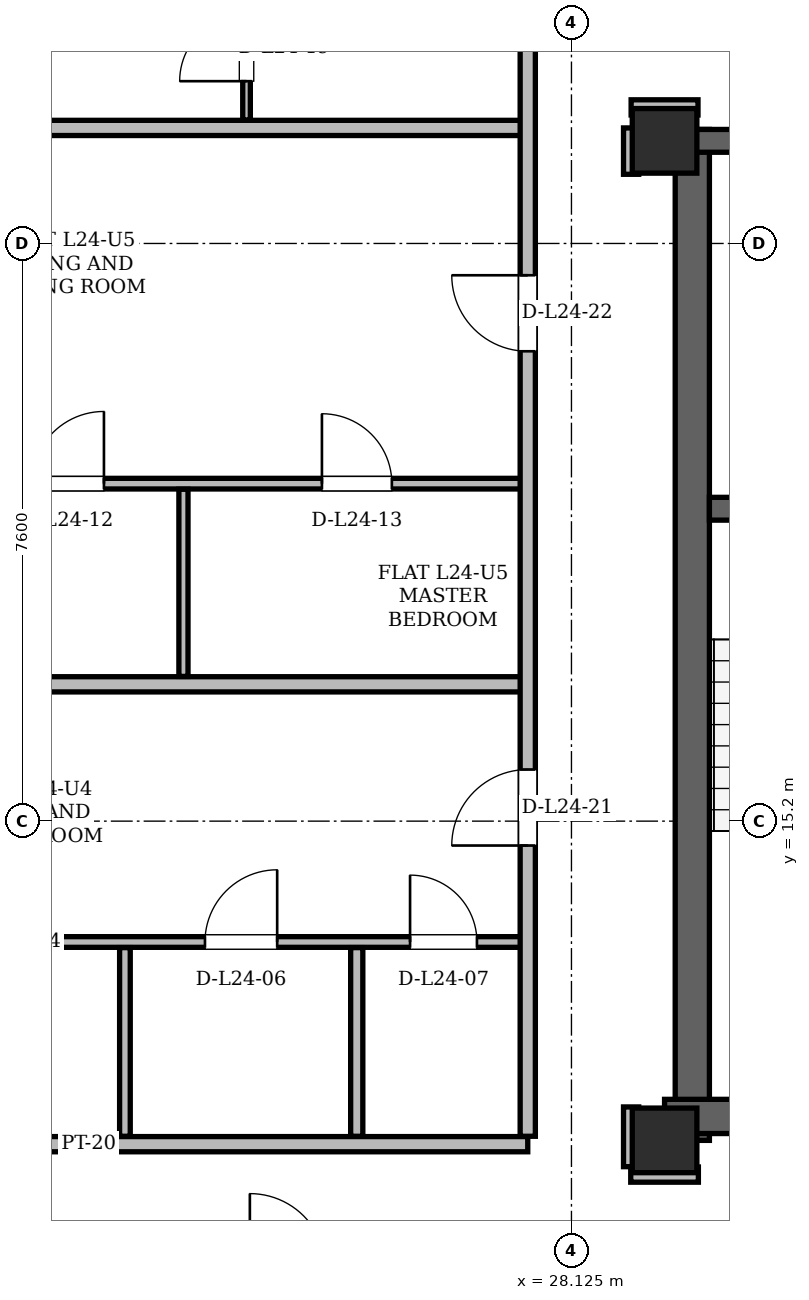
"""IFC4 building model, lengths in metres.
Left out: names, types, materials, properties, quantities, classifications, styles, units other than length and angle.
Written with IfcOpenShell. Run it as: python <this file> out.ifc"""

import sys

from ifc_helpers import new_model, si_unit, direction, frame, frame_2d, origin, origin_2d, place, context, subcontext, project, spatial, rectangle, hollow_rectangle, extrude, element, fill, save


model = new_model("IFC4")
c1 = context("Model", 3, precision=1e-05, world=origin(), true_north=direction((0.0, 1.0)))
c2 = subcontext(c1, "Body", "Model", "MODEL_VIEW")
j1 = project(units=[si_unit("LENGTHUNIT", "METRE"), si_unit("PLANEANGLEUNIT", "RADIAN")], contexts=[c1])
p1 = place(None, origin())
s1 = spatial("IfcSite", under=j1, at=p1, CompositionType="ELEMENT")
p2 = place(p1, origin())
s2 = spatial("IfcBuilding", under=s1, at=p2, CompositionType="ELEMENT")
p3 = place(p2, frame((0.0, 0.0, 93.3)))
s3 = spatial("IfcBuildingStorey", under=s2, at=p3, CompositionType="ELEMENT", Elevation=93.3)
for number, where, z_axis, x_axis in (
    (1, (29.35, 11.0, 0.0), (0.0, 0.0, 1.0), (1.0, 0.0, 0.0)),
    (2, (29.35, 24.15, 0.0), (0.0, 0.0, 1.0), (1.0, 0.0, 0.0)),
):
    element("IfcColumn", number, at=place(p3, frame(where, z_axis=z_axis, x_axis=x_axis)), inside=s3, PredefinedType="COLUMN", context=c2, shape_type="SweptSolid", body=[
        extrude(hollow_rectangle(XDim=0.85, YDim=0.85, WallThickness=0.07, at=origin_2d()), origin(), (0.0, 0.0, 1.0), 3.6),
    ])
p4 = place(p3, frame((29.715, 11.0, 0.0), z_axis=(0.0, 0.0, 1.0), x_axis=(0.0, 1.0, 0.0)))
e3 = element("IfcWall", 3, at=p4, inside=s3, PredefinedType="SHEAR", context=c2, shape_type="SweptSolid", body=[
    extrude(rectangle(XDim=13.3, YDim=0.45, at=frame_2d((6.65, 0.0))), origin(), (0.0, 0.0, 1.0), 3.36),
])
p5 = place(p3, frame((29.35, 11.315, 0.0), z_axis=(0.0, 0.0, 1.0), x_axis=(1.0, 0.0, 0.0)))
e4 = element("IfcWall", 4, at=p5, inside=s3, PredefinedType="SHEAR", context=c2, shape_type="SweptSolid", body=[
    extrude(rectangle(XDim=7.1, YDim=0.45, at=frame_2d((3.55, 0.0))), origin(), (0.0, 0.0, 1.0), 3.36),
])
p6 = place(p3, frame((29.65, 24.15, 0.0), z_axis=(0.0, 0.0, 1.0), x_axis=(1.0, 0.0, 0.0)))
e5 = element("IfcWall", 5, at=p6, inside=s3, PredefinedType="SHEAR", context=c2, shape_type="SweptSolid", body=[
    extrude(rectangle(XDim=15.7, YDim=0.3, at=frame_2d((7.85, 0.0))), origin(), (0.0, 0.0, 1.0), 3.36),
])
p7 = place(p6, frame((1.7, 0.0, 0.0)))
e6 = element("IfcOpeningElement", 6, at=p7, cuts=e5, PredefinedType="OPENING", context=c2, shape_type="SweptSolid", body=[
    extrude(rectangle(XDim=1.2, YDim=2.2, at=frame_2d((0.6, 1.1))), frame((0.0, 0.15, 0.0), z_axis=(0.0, -1.0, 0.0), x_axis=(1.0, 0.0, 0.0)), (0.0, 0.0, 1.0), 0.3),
])
p8 = place(p6, frame((12.8, 0.0, 0.0)))
e7 = element("IfcOpeningElement", 7, at=p8, cuts=e5, PredefinedType="OPENING", context=c2, shape_type="SweptSolid", body=[
    extrude(rectangle(XDim=1.2, YDim=2.2, at=frame_2d((0.6, 1.1))), frame((0.0, 0.15, 0.0), z_axis=(0.0, -1.0, 0.0), x_axis=(1.0, 0.0, 0.0)), (0.0, 0.0, 1.0), 0.3),
])
p9 = place(p6, frame((6.55, 0.0, 0.0)))
e8 = element("IfcOpeningElement", 8, at=p9, cuts=e5, PredefinedType="OPENING", context=c2, shape_type="SweptSolid", body=[
    extrude(rectangle(XDim=0.9, YDim=2.05, at=frame_2d((0.45, 1.025))), frame((0.0, 0.15, 0.0), z_axis=(0.0, -1.0, 0.0), x_axis=(1.0, 0.0, 0.0)), (0.0, 0.0, 1.0), 0.3),
])
p10 = place(p6, frame((8.45, 0.0, 0.0)))
e9 = element("IfcOpeningElement", 9, at=p10, cuts=e5, PredefinedType="OPENING", context=c2, shape_type="SweptSolid", body=[
    extrude(rectangle(XDim=0.9, YDim=2.05, at=frame_2d((0.45, 1.025))), frame((0.0, 0.15, 0.0), z_axis=(0.0, -1.0, 0.0), x_axis=(1.0, 0.0, 0.0)), (0.0, 0.0, 1.0), 0.3),
])
p11 = place(p3, frame((29.94, 19.31, 0.0), z_axis=(0.0, 0.0, 1.0), x_axis=(1.0, 0.0, 0.0)))
e10 = element("IfcWall", 10, at=p11, inside=s3, PredefinedType="SHEAR", context=c2, shape_type="SweptSolid", body=[
    extrude(rectangle(XDim=4.01, YDim=0.3, at=frame_2d((2.005, 0.0))), origin(), (0.0, 0.0, 1.0), 3.36),
])
p12 = place(p11, frame((1.01, 0.0, 0.0)))
e11 = element("IfcOpeningElement", 11, at=p12, cuts=e10, PredefinedType="OPENING", context=c2, shape_type="SweptSolid", body=[
    extrude(rectangle(XDim=1.4, YDim=2.2, at=frame_2d((0.7, 1.1))), frame((0.0, 0.15, 0.0), z_axis=(0.0, -1.0, 0.0), x_axis=(1.0, 0.0, 0.0)), (0.0, 0.0, 1.0), 0.3),
])
p13 = place(p3, frame((31.375, 43.472, 0.0), z_axis=(0.0, 0.0, 1.0), x_axis=(-0.499996390212, -0.866027487886, 0.0)))
e12 = element("IfcWall", 12, at=p13, inside=s3, PredefinedType="SOLIDWALL", context=c2, shape_type="SweptSolid", body=[
    extrude(rectangle(XDim=34.356, YDim=0.34, at=frame_2d((17.178, 0.0))), origin(), (0.0, 0.0, 1.0), 2.578),
])
p14 = place(p13, frame((7.824, 0.0, 0.0)))
e13 = element("IfcOpeningElement", 13, at=p14, cuts=e12, PredefinedType="OPENING", context=c2, shape_type="SweptSolid", body=[
    extrude(rectangle(XDim=1.5, YDim=2.2, at=frame_2d((0.75, 1.1))), frame((0.0, 0.17, 0.0), z_axis=(0.0, -1.0, 0.0), x_axis=(1.0, 0.0, 0.0)), (0.0, 0.0, 1.0), 0.34),
])
p15 = place(p13, frame((25.647, 0.0, 0.0)))
e14 = element("IfcOpeningElement", 14, at=p15, cuts=e12, PredefinedType="OPENING", context=c2, shape_type="SweptSolid", body=[
    extrude(rectangle(XDim=1.5, YDim=2.2, at=frame_2d((0.75, 1.1))), frame((0.0, 0.17, 0.0), z_axis=(0.0, -1.0, 0.0), x_axis=(1.0, 0.0, 0.0)), (0.0, 0.0, 1.0), 0.34),
])
p16 = place(p13, frame((30.715, 0.0, 0.85)))
e15 = element("IfcOpeningElement", 15, at=p16, cuts=e12, PredefinedType="OPENING", context=c2, shape_type="SweptSolid", body=[
    extrude(rectangle(XDim=1.4, YDim=1.6, at=frame_2d((0.7, 0.8))), frame((0.0, 0.17, 0.0), z_axis=(0.0, -1.0, 0.0), x_axis=(1.0, 0.0, 0.0)), (0.0, 0.0, 1.0), 0.34),
])
p17 = place(p13, frame((1.038, 0.0, 0.85)))
e16 = element("IfcOpeningElement", 16, at=p17, cuts=e12, PredefinedType="OPENING", context=c2, shape_type="SweptSolid", body=[
    extrude(rectangle(XDim=2.8, YDim=1.618, at=frame_2d((1.4, 0.809))), frame((0.0, 0.17, 0.0), z_axis=(0.0, -1.0, 0.0), x_axis=(1.0, 0.0, 0.0)), (0.0, 0.0, 1.0), 0.34),
])
p18 = place(p13, frame((12.775, 0.0, 0.85)))
e17 = element("IfcOpeningElement", 17, at=p18, cuts=e12, PredefinedType="OPENING", context=c2, shape_type="SweptSolid", body=[
    extrude(rectangle(XDim=2.2, YDim=1.618, at=frame_2d((1.1, 0.809))), frame((0.0, 0.17, 0.0), z_axis=(0.0, -1.0, 0.0), x_axis=(1.0, 0.0, 0.0)), (0.0, 0.0, 1.0), 0.34),
])
p19 = place(p13, frame((18.07, 0.0, 0.85)))
e18 = element("IfcOpeningElement", 18, at=p19, cuts=e12, PredefinedType="OPENING", context=c2, shape_type="SweptSolid", body=[
    extrude(rectangle(XDim=1.2, YDim=1.48, at=frame_2d((0.6, 0.74))), frame((0.0, 0.17, 0.0), z_axis=(0.0, -1.0, 0.0), x_axis=(1.0, 0.0, 0.0)), (0.0, 0.0, 1.0), 0.34),
])
p20 = place(p3, frame((28.905, 10.55, 0.0), z_axis=(0.0, 0.0, 1.0), x_axis=(1.0, 0.0, 0.0)))
e19 = element("IfcWall", 19, at=p20, inside=s3, PredefinedType="PARTITIONING", context=c2, shape_type="SweptSolid", body=[
    extrude(rectangle(XDim=0.89, YDim=0.2, at=frame_2d((0.445, 0.0))), origin(), (0.0, 0.0, 1.0), 3.36),
])
p21 = place(p3, frame((15.996, 10.95, 0.0), z_axis=(0.0, 0.0, 1.0), x_axis=(1.0, 0.0, 0.0)))
e20 = element("IfcWall", 20, at=p21, inside=s3, PredefinedType="PARTITIONING", context=c2, shape_type="SweptSolid", body=[
    extrude(rectangle(XDim=11.554, YDim=0.2, at=frame_2d((5.777, 0.0))), origin(), (0.0, 0.0, 1.0), 3.36),
])
p22 = place(p3, frame((14.591, 13.61, 0.0), z_axis=(0.0, 0.0, 1.0), x_axis=(1.0, 0.0, 0.0)))
e21 = element("IfcWall", 21, at=p22, inside=s3, PredefinedType="PARTITIONING", context=c2, shape_type="SweptSolid", body=[
    extrude(rectangle(XDim=13.01, YDim=0.14, at=frame_2d((6.505, 0.0))), origin(), (0.0, 0.0, 1.0), 2.814),
])
p23 = place(p22, frame((3.277, 0.0, 0.0)))
e22 = element("IfcOpeningElement", 22, at=p23, cuts=e21, PredefinedType="OPENING", context=c2, shape_type="SweptSolid", body=[
    extrude(rectangle(XDim=0.92, YDim=2.12, at=frame_2d((0.46, 1.06))), frame((0.0, 0.07, 0.0), z_axis=(0.0, -1.0, 0.0), x_axis=(1.0, 0.0, 0.0)), (0.0, 0.0, 1.0), 0.14),
])
p24 = place(p22, frame((8.713, 0.0, 0.0)))
e23 = element("IfcOpeningElement", 23, at=p24, cuts=e21, PredefinedType="OPENING", context=c2, shape_type="SweptSolid", body=[
    extrude(rectangle(XDim=0.95, YDim=2.1, at=frame_2d((0.475, 1.05))), frame((0.0, 0.07, 0.0), z_axis=(0.0, -1.0, 0.0), x_axis=(1.0, 0.0, 0.0)), (0.0, 0.0, 1.0), 0.14),
])
p25 = place(p22, frame((11.411, 0.0, 0.0)))
e24 = element("IfcOpeningElement", 24, at=p25, cuts=e21, PredefinedType="OPENING", context=c2, shape_type="SweptSolid", body=[
    extrude(rectangle(XDim=0.88, YDim=2.08, at=frame_2d((0.44, 1.04))), frame((0.0, 0.07, 0.0), z_axis=(0.0, -1.0, 0.0), x_axis=(1.0, 0.0, 0.0)), (0.0, 0.0, 1.0), 0.14),
])
p26 = place(p3, frame((16.293, 17.0, 0.0), z_axis=(0.0, 0.0, 1.0), x_axis=(1.0, 0.0, 0.0)))
e25 = element("IfcWall", 25, at=p26, inside=s3, PredefinedType="PARTITIONING", context=c2, shape_type="SweptSolid", body=[
    extrude(rectangle(XDim=11.257, YDim=0.2, at=frame_2d((5.629, 0.0))), origin(), (0.0, 0.0, 1.0), 3.36),
])
p27 = place(p3, frame((17.817, 19.64, 0.0), z_axis=(0.0, 0.0, 1.0), x_axis=(1.0, 0.0, 0.0)))
e26 = element("IfcWall", 26, at=p27, inside=s3, PredefinedType="PARTITIONING", context=c2, shape_type="SweptSolid", body=[
    extrude(rectangle(XDim=9.783, YDim=0.14, at=frame_2d((4.892, 0.0))), origin(), (0.0, 0.0, 1.0), 3.36),
])
p28 = place(p27, frame((0.608, 0.0, 0.0)))
e27 = element("IfcOpeningElement", 27, at=p28, cuts=e26, PredefinedType="OPENING", context=c2, shape_type="SweptSolid", body=[
    extrude(rectangle(XDim=0.88, YDim=2.08, at=frame_2d((0.44, 1.04))), frame((0.0, 0.07, 0.0), z_axis=(0.0, -1.0, 0.0), x_axis=(1.0, 0.0, 0.0)), (0.0, 0.0, 1.0), 0.14),
])
p29 = place(p27, frame((3.207, 0.0, 0.0)))
e28 = element("IfcOpeningElement", 28, at=p29, cuts=e26, PredefinedType="OPENING", context=c2, shape_type="SweptSolid", body=[
    extrude(rectangle(XDim=0.95, YDim=2.1, at=frame_2d((0.475, 1.05))), frame((0.0, 0.07, 0.0), z_axis=(0.0, -1.0, 0.0), x_axis=(1.0, 0.0, 0.0)), (0.0, 0.0, 1.0), 0.14),
])
p30 = place(p27, frame((7.025, 0.0, 0.0)))
e29 = element("IfcOpeningElement", 29, at=p30, cuts=e26, PredefinedType="OPENING", context=c2, shape_type="SweptSolid", body=[
    extrude(rectangle(XDim=0.92, YDim=2.12, at=frame_2d((0.46, 1.06))), frame((0.0, 0.07, 0.0), z_axis=(0.0, -1.0, 0.0), x_axis=(1.0, 0.0, 0.0)), (0.0, 0.0, 1.0), 0.14),
])
p31 = place(p3, frame((20.519, 24.32, 0.0), z_axis=(0.0, 0.0, 1.0), x_axis=(1.0, 0.0, 0.0)))
e30 = element("IfcWall", 30, at=p31, inside=s3, PredefinedType="PARTITIONING", context=c2, shape_type="SweptSolid", body=[
    extrude(rectangle(XDim=7.031, YDim=0.2, at=frame_2d((3.516, 0.0))), origin(), (0.0, 0.0, 1.0), 3.36),
])
p32 = place(p3, frame((28.91, 24.59, 0.0), z_axis=(0.0, 0.0, 1.0), x_axis=(1.0, 0.0, 0.0)))
e31 = element("IfcWall", 31, at=p32, inside=s3, PredefinedType="PARTITIONING", context=c2, shape_type="SweptSolid", body=[
    extrude(rectangle(XDim=0.88, YDim=0.2, at=frame_2d((0.44, 0.0))), origin(), (0.0, 0.0, 1.0), 2.814),
])
p33 = place(p3, frame((22.25, 11.054, 0.0), z_axis=(0.0, 0.0, 1.0), x_axis=(0.0, 1.0, 0.0)))
e32 = element("IfcWall", 32, at=p33, inside=s3, PredefinedType="PARTITIONING", context=c2, shape_type="SweptSolid", body=[
    extrude(rectangle(XDim=2.482, YDim=0.14, at=frame_2d((1.241, 0.0))), origin(), (0.0, 0.0, 1.0), 2.814),
])
p34 = place(p3, frame((23.02, 17.104, 0.0), z_axis=(0.0, 0.0, 1.0), x_axis=(0.0, 1.0, 0.0)))
e33 = element("IfcWall", 33, at=p34, inside=s3, PredefinedType="PARTITIONING", context=c2, shape_type="SweptSolid", body=[
    extrude(rectangle(XDim=2.462, YDim=0.12, at=frame_2d((1.231, 0.0))), origin(), (0.0, 0.0, 1.0), 3.36),
])
p35 = place(p3, frame((23.85, 24.424, 0.0), z_axis=(0.0, 0.0, 1.0), x_axis=(0.0, 1.0, 0.0)))
e34 = element("IfcWall", 34, at=p35, inside=s3, PredefinedType="PARTITIONING", context=c2, shape_type="SweptSolid", body=[
    extrude(rectangle(XDim=5.666, YDim=0.1, at=frame_2d((2.833, 0.0))), origin(), (0.0, 0.0, 1.0), 2.578),
])
p36 = place(p35, frame((0.511, 0.0, 0.0)))
e35 = element("IfcOpeningElement", 35, at=p36, cuts=e34, PredefinedType="OPENING", context=c2, shape_type="SweptSolid", body=[
    extrude(rectangle(XDim=0.88, YDim=2.08, at=frame_2d((0.44, 1.04))), frame((0.0, 0.05, 0.0), z_axis=(0.0, -1.0, 0.0), x_axis=(1.0, 0.0, 0.0)), (0.0, 0.0, 1.0), 0.1),
])
p37 = place(p35, frame((3.418, 0.0, 0.0)))
e36 = element("IfcOpeningElement", 36, at=p37, cuts=e34, PredefinedType="OPENING", context=c2, shape_type="SweptSolid", body=[
    extrude(rectangle(XDim=0.95, YDim=2.1, at=frame_2d((0.475, 1.05))), frame((0.0, 0.05, 0.0), z_axis=(0.0, -1.0, 0.0), x_axis=(1.0, 0.0, 0.0)), (0.0, 0.0, 1.0), 0.1),
])
p38 = place(p3, frame((25.3, 11.054, 0.0), z_axis=(0.0, 0.0, 1.0), x_axis=(0.0, 1.0, 0.0)))
e37 = element("IfcWall", 37, at=p38, inside=s3, PredefinedType="PARTITIONING", context=c2, shape_type="SweptSolid", body=[
    extrude(rectangle(XDim=2.482, YDim=0.16, at=frame_2d((1.241, 0.0))), origin(), (0.0, 0.0, 1.0), 2.814),
])
p39 = place(p3, frame((27.55, 11.054, 0.0), z_axis=(0.0, 0.0, 1.0), x_axis=(0.0, 1.0, 0.0)))
e38 = element("IfcWall", 38, at=p39, inside=s3, PredefinedType="PARTITIONING", context=c2, shape_type="SweptSolid", body=[
    extrude(rectangle(XDim=14.812, YDim=0.2, at=frame_2d((7.406, 0.0))), origin(), (0.0, 0.0, 1.0), 2.814),
])
p40 = place(p39, frame((3.825, 0.0, 0.0)))
e39 = element("IfcOpeningElement", 39, at=p40, cuts=e38, PredefinedType="OPENING", context=c2, shape_type="SweptSolid", body=[
    extrude(rectangle(XDim=1.0, YDim=2.18, at=frame_2d((0.5, 1.09))), frame((0.0, 0.1, 0.0), z_axis=(0.0, -1.0, 0.0), x_axis=(1.0, 0.0, 0.0)), (0.0, 0.0, 1.0), 0.2),
])
p41 = place(p39, frame((10.328, 0.0, 0.0)))
e40 = element("IfcOpeningElement", 40, at=p41, cuts=e38, PredefinedType="OPENING", context=c2, shape_type="SweptSolid", body=[
    extrude(rectangle(XDim=1.0, YDim=2.18, at=frame_2d((0.5, 1.09))), frame((0.0, 0.1, 0.0), z_axis=(0.0, -1.0, 0.0), x_axis=(1.0, 0.0, 0.0)), (0.0, 0.0, 1.0), 0.2),
])
p42 = place(p3, frame((28.91, 10.654, 0.0), z_axis=(0.0, 0.0, 1.0), x_axis=(0.0, 1.0, 0.0)))
e41 = element("IfcWall", 41, at=p42, inside=s3, PredefinedType="PARTITIONING", context=c2, shape_type="SweptSolid", body=[
    extrude(rectangle(XDim=0.786, YDim=0.2, at=frame_2d((0.393, 0.0))), origin(), (0.0, 0.0, 1.0), 2.814),
])
p43 = place(p3, frame((28.91, 23.71, 0.0), z_axis=(0.0, 0.0, 1.0), x_axis=(0.0, 1.0, 0.0)))
e42 = element("IfcWall", 42, at=p43, inside=s3, PredefinedType="PARTITIONING", context=c2, shape_type="SweptSolid", body=[
    extrude(rectangle(XDim=0.61, YDim=0.2, at=frame_2d((0.305, 0.0))), origin(), (0.0, 0.0, 1.0), 3.36),
])
p44 = place(p24, origin())
e43 = element("IfcDoor", 43, at=p44, inside=s3, OperationType="SINGLE_SWING_RIGHT", PredefinedType="DOOR", context=c2, shape_type="SweptSolid", body=[
    extrude(rectangle(XDim=0.95, YDim=2.1, at=frame_2d((0.475, 1.05))), frame((0.0, 0.025, 0.0), z_axis=(0.0, -1.0, 0.0), x_axis=(1.0, 0.0, 0.0)), (0.0, 0.0, 1.0), 0.05),
])
fill(e23, e43)
p45 = place(p25, origin())
e44 = element("IfcDoor", 44, at=p45, inside=s3, OperationType="SINGLE_SWING_LEFT", PredefinedType="DOOR", context=c2, shape_type="SweptSolid", body=[
    extrude(rectangle(XDim=0.88, YDim=2.08, at=frame_2d((0.44, 1.04))), frame((0.0, 0.025, 0.0), z_axis=(0.0, -1.0, 0.0), x_axis=(1.0, 0.0, 0.0)), (0.0, 0.0, 1.0), 0.05),
])
fill(e24, e44)
p46 = place(p29, origin())
e45 = element("IfcDoor", 45, at=p46, inside=s3, OperationType="SINGLE_SWING_RIGHT", PredefinedType="DOOR", context=c2, shape_type="SweptSolid", body=[
    extrude(rectangle(XDim=0.95, YDim=2.1, at=frame_2d((0.475, 1.05))), frame((0.0, 0.025, 0.0), z_axis=(0.0, -1.0, 0.0), x_axis=(1.0, 0.0, 0.0)), (0.0, 0.0, 1.0), 0.05),
])
fill(e28, e45)
p47 = place(p30, origin())
e46 = element("IfcDoor", 46, at=p47, inside=s3, OperationType="SINGLE_SWING_LEFT", PredefinedType="DOOR", context=c2, shape_type="SweptSolid", body=[
    extrude(rectangle(XDim=0.92, YDim=2.12, at=frame_2d((0.46, 1.06))), frame((0.0, 0.025, 0.0), z_axis=(0.0, -1.0, 0.0), x_axis=(1.0, 0.0, 0.0)), (0.0, 0.0, 1.0), 0.05),
])
fill(e29, e46)
p48 = place(p36, origin())
e47 = element("IfcDoor", 47, at=p48, inside=s3, OperationType="SINGLE_SWING_LEFT", PredefinedType="DOOR", context=c2, shape_type="SweptSolid", body=[
    extrude(rectangle(XDim=0.88, YDim=2.08, at=frame_2d((0.44, 1.04))), frame((0.0, 0.025, 0.0), z_axis=(0.0, -1.0, 0.0), x_axis=(1.0, 0.0, 0.0)), (0.0, 0.0, 1.0), 0.05),
])
fill(e35, e47)
p49 = place(p40, origin())
e48 = element("IfcDoor", 48, at=p49, inside=s3, OperationType="SINGLE_SWING_LEFT", PredefinedType="DOOR", context=c2, shape_type="SweptSolid", body=[
    extrude(rectangle(XDim=1.0, YDim=2.18, at=frame_2d((0.5, 1.09))), frame((0.0, 0.025, 0.0), z_axis=(0.0, -1.0, 0.0), x_axis=(1.0, 0.0, 0.0)), (0.0, 0.0, 1.0), 0.05),
])
fill(e39, e48)
p50 = place(p41, origin())
e49 = element("IfcDoor", 49, at=p50, inside=s3, OperationType="SINGLE_SWING_RIGHT", PredefinedType="DOOR", context=c2, shape_type="SweptSolid", body=[
    extrude(rectangle(XDim=1.0, YDim=2.18, at=frame_2d((0.5, 1.09))), frame((0.0, 0.025, 0.0), z_axis=(0.0, -1.0, 0.0), x_axis=(1.0, 0.0, 0.0)), (0.0, 0.0, 1.0), 0.05),
])
fill(e40, e49)
save(model, sys.argv[1])
